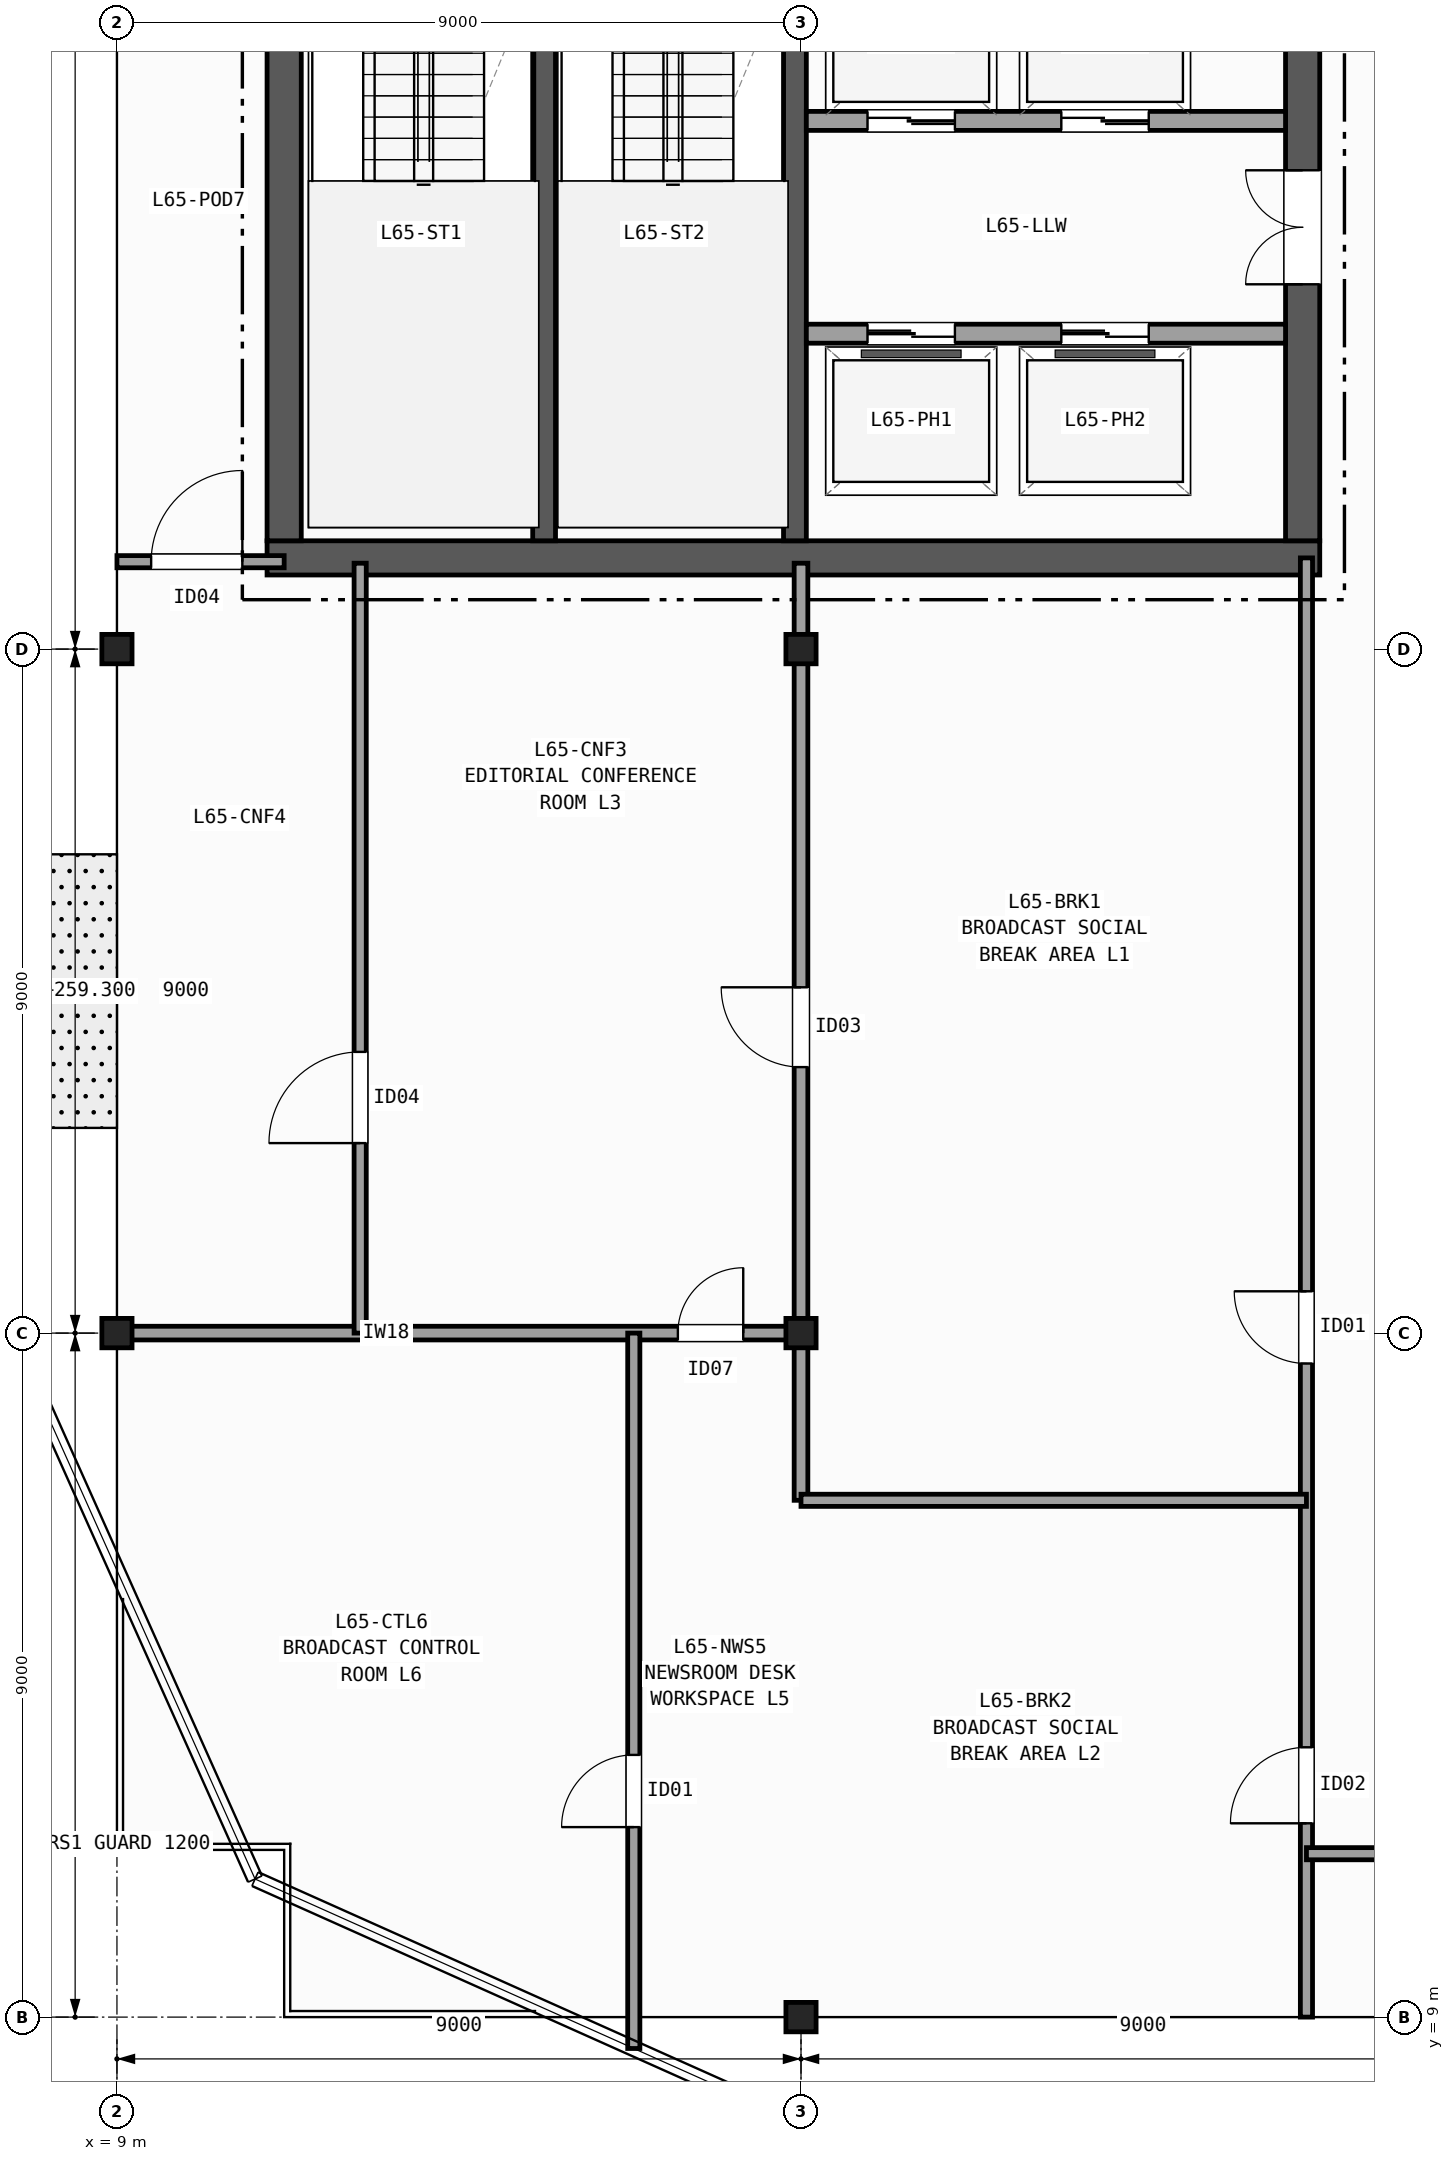
"""IFC4 building model, lengths in metres.
Left out: names, types, materials, properties, quantities, classifications, styles, units other than length and angle.
Written with IfcOpenShell. Run it as: python <this file> out.ifc"""

import sys

from ifc_helpers import new_model, si_unit, direction, frame, frame_2d, origin, origin_2d, place, context, subcontext, project, spatial, rectangle, i_section, extrude, element, fill, save


model = new_model("IFC4")
c1 = context("Model", 3, precision=1e-05, world=origin(), true_north=direction((0.0, 1.0)))
c2 = subcontext(c1, "Body", "Model", "MODEL_VIEW")
j1 = project(units=[si_unit("LENGTHUNIT", "METRE"), si_unit("PLANEANGLEUNIT", "RADIAN")], contexts=[c1])
p1 = place(None, origin())
s1 = spatial("IfcSite", under=j1, at=p1, CompositionType="ELEMENT")
p2 = place(p1, origin())
s2 = spatial("IfcBuilding", under=s1, at=p2, CompositionType="ELEMENT")
p3 = place(p2, frame((0.0, 0.0, 259.3)))
s3 = spatial("IfcBuildingStorey", under=s2, at=p3, CompositionType="ELEMENT", Elevation=259.3)
for number, where, z_axis, x_axis in (
    (1, (9.0, 18.0, 0.0), (0.0, 0.0, 1.0), (1.0, 0.0, 0.0)),
    (2, (9.0, 27.0, 0.0), (0.0, 0.0, 1.0), (1.0, 0.0, 0.0)),
    (3, (18.0, 9.0, 0.0), (0.0, 0.0, 1.0), (1.0, 0.0, 0.0)),
    (4, (18.0, 18.0, 0.0), (0.0, 0.0, 1.0), (1.0, 0.0, 0.0)),
    (5, (18.0, 27.0, 0.0), (0.0, 0.0, 1.0), (1.0, 0.0, 0.0)),
):
    element("IfcColumn", number, at=place(p3, frame(where, z_axis=z_axis, x_axis=x_axis)), inside=s3, PredefinedType="COLUMN", context=c2, shape_type="SweptSolid", body=[
        extrude(i_section(OverallWidth=0.397, OverallDepth=0.387, WebThickness=0.021, FlangeThickness=0.033, FilletRadius=0.015, at=origin_2d()), origin(), (0.0, 0.0, 1.0), 3.7),
    ])
p4 = place(p3, frame((10.975, 28.2, 0.0), z_axis=(0.0, 0.0, 1.0), x_axis=(1.0, 0.0, 0.0)))
e6 = element("IfcWall", 6, at=p4, inside=s3, PredefinedType="SHEAR", context=c2, shape_type="SweptSolid", body=[
    extrude(rectangle(XDim=13.85, YDim=0.45, at=frame_2d((6.925, 0.0))), origin(), (0.0, 0.0, 1.0), 3.42),
])
p5 = place(p3, frame((11.2, 42.175, 0.0), z_axis=(0.0, 0.0, 1.0), x_axis=(0.0, -1.0, 0.0)))
e7 = element("IfcWall", 7, at=p5, inside=s3, PredefinedType="SHEAR", context=c2, shape_type="SweptSolid", body=[
    extrude(rectangle(XDim=13.75, YDim=0.45, at=frame_2d((6.875, 0.0))), origin(), (0.0, 0.0, 1.0), 3.42),
])
p6 = place(p3, frame((24.6, 28.425, 0.0), z_axis=(0.0, 0.0, 1.0), x_axis=(0.0, 1.0, 0.0)))
e8 = element("IfcWall", 8, at=p6, inside=s3, PredefinedType="SHEAR", context=c2, shape_type="SweptSolid", body=[
    extrude(rectangle(XDim=13.75, YDim=0.45, at=frame_2d((6.875, 0.0))), origin(), (0.0, 0.0, 1.0), 3.42),
])
p7 = place(p6, frame((3.375, 0.0, 0.0)))
e9 = element("IfcOpeningElement", 9, at=p7, cuts=e8, PredefinedType="OPENING", context=c2, shape_type="SweptSolid", body=[
    extrude(rectangle(XDim=1.5, YDim=2.2, at=frame_2d((0.75, 1.1))), frame((0.0, 0.235, 0.0), z_axis=(0.0, -1.0, 0.0), x_axis=(1.0, 0.0, 0.0)), (0.0, 0.0, 1.0), 0.47),
])
p8 = place(p6, frame((9.975, 0.0, 0.0)))
e10 = element("IfcOpeningElement", 10, at=p8, cuts=e8, PredefinedType="OPENING", context=c2, shape_type="SweptSolid", body=[
    extrude(rectangle(XDim=0.9, YDim=2.1, at=frame_2d((0.45, 1.05))), frame((0.0, 0.235, 0.0), z_axis=(0.0, -1.0, 0.0), x_axis=(1.0, 0.0, 0.0)), (0.0, 0.0, 1.0), 0.47),
])
p9 = place(p3, frame((14.62, 28.425, 0.0), z_axis=(0.0, 0.0, 1.0), x_axis=(0.0, 1.0, 0.0)))
e11 = element("IfcWall", 11, at=p9, inside=s3, PredefinedType="SHEAR", context=c2, shape_type="SweptSolid", body=[
    extrude(rectangle(XDim=9.025, YDim=0.3, at=frame_2d((4.512, 0.0))), origin(), (0.0, 0.0, 1.0), 3.42),
])
p10 = place(p3, frame((17.92, 42.175, 0.0), z_axis=(0.0, 0.0, 1.0), x_axis=(0.0, -1.0, 0.0)))
e12 = element("IfcWall", 12, at=p10, inside=s3, PredefinedType="SHEAR", context=c2, shape_type="SweptSolid", body=[
    extrude(rectangle(XDim=13.75, YDim=0.3, at=frame_2d((6.875, 0.0))), origin(), (0.0, 0.0, 1.0), 3.42),
])
p11 = place(p10, frame((2.0, 0.0, 0.0)))
e13 = element("IfcOpeningElement", 13, at=p11, cuts=e12, PredefinedType="OPENING", context=c2, shape_type="SweptSolid", body=[
    extrude(rectangle(XDim=1.15, YDim=2.15, at=frame_2d((0.575, 1.075))), frame((0.0, 0.16, 0.0), z_axis=(0.0, -1.0, 0.0), x_axis=(1.0, 0.0, 0.0)), (0.0, 0.0, 1.0), 0.32),
])
p12 = place(p3, frame((18.07, 31.15, 0.0), z_axis=(0.0, 0.0, 1.0), x_axis=(1.0, 0.0, 0.0)))
e14 = element("IfcWall", 14, at=p12, inside=s3, PredefinedType="PARTITIONING", context=c2, shape_type="SweptSolid", body=[
    extrude(rectangle(XDim=6.305, YDim=0.25, at=frame_2d((3.152, 0.0))), origin(), (0.0, 0.0, 1.0), 3.42),
])
p13 = place(p12, frame((0.805, 0.0, 0.0)))
e15 = element("IfcOpeningElement", 15, at=p13, cuts=e14, PredefinedType="OPENING", context=c2, shape_type="SweptSolid", body=[
    extrude(rectangle(XDim=1.15, YDim=2.15, at=frame_2d((0.575, 1.075))), frame((0.0, 0.135, 0.0), z_axis=(0.0, -1.0, 0.0), x_axis=(1.0, 0.0, 0.0)), (0.0, 0.0, 1.0), 0.27),
])
p14 = place(p12, frame((3.355, 0.0, 0.0)))
e16 = element("IfcOpeningElement", 16, at=p14, cuts=e14, PredefinedType="OPENING", context=c2, shape_type="SweptSolid", body=[
    extrude(rectangle(XDim=1.15, YDim=2.15, at=frame_2d((0.575, 1.075))), frame((0.0, 0.135, 0.0), z_axis=(0.0, -1.0, 0.0), x_axis=(1.0, 0.0, 0.0)), (0.0, 0.0, 1.0), 0.27),
])
p15 = place(p3, frame((24.375, 33.95, 0.0), z_axis=(0.0, 0.0, 1.0), x_axis=(-1.0, 0.0, 0.0)))
e17 = element("IfcWall", 17, at=p15, inside=s3, PredefinedType="PARTITIONING", context=c2, shape_type="SweptSolid", body=[
    extrude(rectangle(XDim=6.305, YDim=0.25, at=frame_2d((3.152, 0.0))), origin(), (0.0, 0.0, 1.0), 3.42),
])
p16 = place(p15, frame((4.35, 0.0, 0.0)))
e18 = element("IfcOpeningElement", 18, at=p16, cuts=e17, PredefinedType="OPENING", context=c2, shape_type="SweptSolid", body=[
    extrude(rectangle(XDim=1.15, YDim=2.15, at=frame_2d((0.575, 1.075))), frame((0.0, 0.135, 0.0), z_axis=(0.0, -1.0, 0.0), x_axis=(1.0, 0.0, 0.0)), (0.0, 0.0, 1.0), 0.27),
])
p17 = place(p15, frame((1.8, 0.0, 0.0)))
e19 = element("IfcOpeningElement", 19, at=p17, cuts=e17, PredefinedType="OPENING", context=c2, shape_type="SweptSolid", body=[
    extrude(rectangle(XDim=1.15, YDim=2.15, at=frame_2d((0.575, 1.075))), frame((0.0, 0.135, 0.0), z_axis=(0.0, -1.0, 0.0), x_axis=(1.0, 0.0, 0.0)), (0.0, 0.0, 1.0), 0.27),
])
p18 = place(p3, frame((9.0, 28.15, 0.0), z_axis=(0.0, 0.0, 1.0), x_axis=(1.0, 0.0, 0.0)))
e20 = element("IfcWall", 20, at=p18, inside=s3, PredefinedType="PARTITIONING", context=c2, shape_type="SweptSolid", body=[
    extrude(rectangle(XDim=2.2, YDim=0.16, at=frame_2d((1.1, 0.0))), origin(), (0.0, 0.0, 1.0), 2.707),
])
p19 = place(p18, frame((0.45, 0.0, 0.0)))
e21 = element("IfcOpeningElement", 21, at=p19, cuts=e20, PredefinedType="OPENING", context=c2, shape_type="SweptSolid", body=[
    extrude(rectangle(XDim=1.2, YDim=2.15, at=frame_2d((0.6, 1.075))), frame((0.0, 0.09, 0.0), z_axis=(0.0, -1.0, 0.0), x_axis=(1.0, 0.0, 0.0)), (0.0, 0.0, 1.0), 0.18),
])
p20 = place(p3, frame((24.65, 9.0, 0.0), z_axis=(0.0, 0.0, 1.0), x_axis=(0.0, 1.0, 0.0)))
e22 = element("IfcWall", 22, at=p20, inside=s3, PredefinedType="PARTITIONING", context=c2, shape_type="SweptSolid", body=[
    extrude(rectangle(XDim=19.2, YDim=0.16, at=frame_2d((9.6, 0.0))), origin(), (0.0, 0.0, 1.0), 2.707),
])
p21 = place(p20, frame((8.6, 0.0, 0.0)))
e23 = element("IfcOpeningElement", 23, at=p21, cuts=e22, PredefinedType="OPENING", context=c2, shape_type="SweptSolid", body=[
    extrude(rectangle(XDim=0.95, YDim=2.1, at=frame_2d((0.475, 1.05))), frame((0.0, 0.09, 0.0), z_axis=(0.0, -1.0, 0.0), x_axis=(1.0, 0.0, 0.0)), (0.0, 0.0, 1.0), 0.18),
])
p22 = place(p20, frame((2.55, 0.0, 0.0)))
e24 = element("IfcOpeningElement", 24, at=p22, cuts=e22, PredefinedType="OPENING", context=c2, shape_type="SweptSolid", body=[
    extrude(rectangle(XDim=1.0, YDim=2.1, at=frame_2d((0.5, 1.05))), frame((0.0, 0.09, 0.0), z_axis=(0.0, -1.0, 0.0), x_axis=(1.0, 0.0, 0.0)), (0.0, 0.0, 1.0), 0.18),
])
p23 = place(p3, frame((9.0, 18.0, 0.0), z_axis=(0.0, 0.0, 1.0), x_axis=(1.0, 0.0, 0.0)))
e25 = element("IfcWall", 25, at=p23, inside=s3, PredefinedType="PARTITIONING", context=c2, shape_type="SweptSolid", body=[
    extrude(rectangle(XDim=9.08, YDim=0.18, at=frame_2d((4.54, 0.0))), origin(), (0.0, 0.0, 1.0), 2.707),
])
p24 = place(p23, frame((7.38, 0.0, 0.0)))
e26 = element("IfcOpeningElement", 26, at=p24, cuts=e25, PredefinedType="OPENING", context=c2, shape_type="SweptSolid", body=[
    extrude(rectangle(XDim=0.86, YDim=2.05, at=frame_2d((0.43, 1.025))), frame((0.0, 0.1, 0.0), z_axis=(0.0, -1.0, 0.0), x_axis=(1.0, 0.0, 0.0)), (0.0, 0.0, 1.0), 0.2),
])
p25 = place(p3, frame((18.0, 15.8, 0.0), z_axis=(0.0, 0.0, 1.0), x_axis=(0.0, 1.0, 0.0)))
e27 = element("IfcWall", 27, at=p25, inside=s3, PredefinedType="PARTITIONING", context=c2, shape_type="SweptSolid", body=[
    extrude(rectangle(XDim=12.33, YDim=0.18, at=frame_2d((6.165, 0.0))), origin(), (0.0, 0.0, 1.0), 2.789),
])
p26 = place(p25, frame((5.7, 0.0, 0.0)))
e28 = element("IfcOpeningElement", 28, at=p26, cuts=e27, PredefinedType="OPENING", context=c2, shape_type="SweptSolid", body=[
    extrude(rectangle(XDim=1.05, YDim=2.15, at=frame_2d((0.525, 1.075))), frame((0.0, 0.1, 0.0), z_axis=(0.0, -1.0, 0.0), x_axis=(1.0, 0.0, 0.0)), (0.0, 0.0, 1.0), 0.2),
])
p27 = place(p3, frame((18.0, 15.8, 0.0), z_axis=(0.0, 0.0, 1.0), x_axis=(1.0, 0.0, 0.0)))
e29 = element("IfcWall", 29, at=p27, inside=s3, PredefinedType="PARTITIONING", context=c2, shape_type="SweptSolid", body=[
    extrude(rectangle(XDim=6.65, YDim=0.16, at=frame_2d((3.325, 0.0))), origin(), (0.0, 0.0, 1.0), 2.789),
])
p28 = place(p3, frame((12.2, 18.0, 0.0), z_axis=(0.0, 0.0, 1.0), x_axis=(0.0, 1.0, 0.0)))
e30 = element("IfcWall", 30, at=p28, inside=s3, PredefinedType="PARTITIONING", context=c2, shape_type="SweptSolid", body=[
    extrude(rectangle(XDim=10.13, YDim=0.16, at=frame_2d((5.065, 0.0))), origin(), (0.0, 0.0, 1.0), 2.789),
])
p29 = place(p28, frame((2.5, 0.0, 0.0)))
e31 = element("IfcOpeningElement", 31, at=p29, cuts=e30, PredefinedType="OPENING", context=c2, shape_type="SweptSolid", body=[
    extrude(rectangle(XDim=1.2, YDim=2.15, at=frame_2d((0.6, 1.075))), frame((0.0, 0.09, 0.0), z_axis=(0.0, -1.0, 0.0), x_axis=(1.0, 0.0, 0.0)), (0.0, 0.0, 1.0), 0.18),
])
p30 = place(p3, frame((15.8, 8.587, 0.0), z_axis=(0.0, 0.0, 1.0), x_axis=(0.0, 1.0, 0.0)))
e32 = element("IfcWall", 32, at=p30, inside=s3, PredefinedType="PARTITIONING", context=c2, shape_type="SweptSolid", body=[
    extrude(rectangle(XDim=9.413, YDim=0.16, at=frame_2d((4.707, 0.0))), origin(), (0.0, 0.0, 1.0), 2.789),
])
p31 = place(p30, frame((2.913, 0.0, 0.0)))
e33 = element("IfcOpeningElement", 33, at=p31, cuts=e32, PredefinedType="OPENING", context=c2, shape_type="SweptSolid", body=[
    extrude(rectangle(XDim=0.95, YDim=2.1, at=frame_2d((0.475, 1.05))), frame((0.0, 0.09, 0.0), z_axis=(0.0, -1.0, 0.0), x_axis=(1.0, 0.0, 0.0)), (0.0, 0.0, 1.0), 0.18),
])
p32 = place(p3, frame((24.65, 11.15, 0.0), z_axis=(0.0, 0.0, 1.0), x_axis=(1.0, 0.0, 0.0)))
e34 = element("IfcWall", 34, at=p32, inside=s3, PredefinedType="PARTITIONING", context=c2, shape_type="SweptSolid", body=[
    extrude(rectangle(XDim=4.75, YDim=0.16, at=frame_2d((2.375, 0.0))), origin(), (0.0, 0.0, 1.0), 2.792),
])
p33 = place(p32, frame((1.2, 0.0, 0.0)))
e35 = element("IfcOpeningElement", 35, at=p33, cuts=e34, PredefinedType="OPENING", context=c2, shape_type="SweptSolid", body=[
    extrude(rectangle(XDim=1.0, YDim=2.1, at=frame_2d((0.5, 1.05))), frame((0.0, 0.09, 0.0), z_axis=(0.0, -1.0, 0.0), x_axis=(1.0, 0.0, 0.0)), (0.0, 0.0, 1.0), 0.18),
])
p34 = place(p7, origin())
e36 = element("IfcDoor", 36, at=p34, inside=s3, OperationType="DOUBLE_DOOR_SINGLE_SWING", PredefinedType="DOOR", context=c2, shape_type="SweptSolid", body=[
    extrude(rectangle(XDim=1.5, YDim=2.2, at=frame_2d((0.75, 1.1))), frame((0.0, 0.025, 0.0), z_axis=(0.0, -1.0, 0.0), x_axis=(1.0, 0.0, 0.0)), (0.0, 0.0, 1.0), 0.05),
])
fill(e9, e36)
p35 = place(p13, origin())
e37 = element("IfcDoor", 37, at=p35, inside=s3, OperationType="DOUBLE_DOOR_SLIDING", PredefinedType="DOOR", context=c2, shape_type="SweptSolid", body=[
    extrude(rectangle(XDim=1.15, YDim=2.15, at=frame_2d((0.575, 1.075))), frame((0.0, 0.025, 0.0), z_axis=(0.0, -1.0, 0.0), x_axis=(1.0, 0.0, 0.0)), (0.0, 0.0, 1.0), 0.05),
])
fill(e15, e37)
p36 = place(p14, origin())
e38 = element("IfcDoor", 38, at=p36, inside=s3, OperationType="DOUBLE_DOOR_SLIDING", PredefinedType="DOOR", context=c2, shape_type="SweptSolid", body=[
    extrude(rectangle(XDim=1.15, YDim=2.15, at=frame_2d((0.575, 1.075))), frame((0.0, 0.025, 0.0), z_axis=(0.0, -1.0, 0.0), x_axis=(1.0, 0.0, 0.0)), (0.0, 0.0, 1.0), 0.05),
])
fill(e16, e38)
p37 = place(p16, origin())
e39 = element("IfcDoor", 39, at=p37, inside=s3, OperationType="DOUBLE_DOOR_SLIDING", PredefinedType="DOOR", context=c2, shape_type="SweptSolid", body=[
    extrude(rectangle(XDim=1.15, YDim=2.15, at=frame_2d((0.575, 1.075))), frame((0.0, 0.025, 0.0), z_axis=(0.0, -1.0, 0.0), x_axis=(1.0, 0.0, 0.0)), (0.0, 0.0, 1.0), 0.05),
])
fill(e18, e39)
p38 = place(p17, origin())
e40 = element("IfcDoor", 40, at=p38, inside=s3, OperationType="DOUBLE_DOOR_SLIDING", PredefinedType="DOOR", context=c2, shape_type="SweptSolid", body=[
    extrude(rectangle(XDim=1.15, YDim=2.15, at=frame_2d((0.575, 1.075))), frame((0.0, 0.025, 0.0), z_axis=(0.0, -1.0, 0.0), x_axis=(1.0, 0.0, 0.0)), (0.0, 0.0, 1.0), 0.05),
])
fill(e19, e40)
p39 = place(p19, origin())
e41 = element("IfcDoor", 41, at=p39, inside=s3, OperationType="SINGLE_SWING_RIGHT", PredefinedType="DOOR", context=c2, shape_type="SweptSolid", body=[
    extrude(rectangle(XDim=1.2, YDim=2.15, at=frame_2d((0.6, 1.075))), frame((0.0, 0.025, 0.0), z_axis=(0.0, -1.0, 0.0), x_axis=(1.0, 0.0, 0.0)), (0.0, 0.0, 1.0), 0.05),
])
fill(e21, e41)
p40 = place(p21, origin())
e42 = element("IfcDoor", 42, at=p40, inside=s3, OperationType="SINGLE_SWING_RIGHT", PredefinedType="DOOR", context=c2, shape_type="SweptSolid", body=[
    extrude(rectangle(XDim=0.95, YDim=2.1, at=frame_2d((0.475, 1.05))), frame((0.0, 0.025, 0.0), z_axis=(0.0, -1.0, 0.0), x_axis=(1.0, 0.0, 0.0)), (0.0, 0.0, 1.0), 0.05),
])
fill(e23, e42)
p41 = place(p22, origin())
e43 = element("IfcDoor", 43, at=p41, inside=s3, OperationType="SINGLE_SWING_LEFT", PredefinedType="DOOR", context=c2, shape_type="SweptSolid", body=[
    extrude(rectangle(XDim=1.0, YDim=2.1, at=frame_2d((0.5, 1.05))), frame((0.0, 0.025, 0.0), z_axis=(0.0, -1.0, 0.0), x_axis=(1.0, 0.0, 0.0)), (0.0, 0.0, 1.0), 0.05),
])
fill(e24, e43)
p42 = place(p26, origin())
e44 = element("IfcDoor", 44, at=p42, inside=s3, OperationType="SINGLE_SWING_RIGHT", PredefinedType="DOOR", context=c2, shape_type="SweptSolid", body=[
    extrude(rectangle(XDim=1.05, YDim=2.15, at=frame_2d((0.525, 1.075))), frame((0.0, 0.025, 0.0), z_axis=(0.0, -1.0, 0.0), x_axis=(1.0, 0.0, 0.0)), (0.0, 0.0, 1.0), 0.05),
])
fill(e28, e44)
p43 = place(p29, origin())
e45 = element("IfcDoor", 45, at=p43, inside=s3, OperationType="SINGLE_SWING_LEFT", PredefinedType="DOOR", context=c2, shape_type="SweptSolid", body=[
    extrude(rectangle(XDim=1.2, YDim=2.15, at=frame_2d((0.6, 1.075))), frame((0.0, 0.025, 0.0), z_axis=(0.0, -1.0, 0.0), x_axis=(1.0, 0.0, 0.0)), (0.0, 0.0, 1.0), 0.05),
])
fill(e31, e45)
p44 = place(p24, origin())
e46 = element("IfcDoor", 46, at=p44, inside=s3, OperationType="SINGLE_SWING_RIGHT", PredefinedType="DOOR", context=c2, shape_type="SweptSolid", body=[
    extrude(rectangle(XDim=0.86, YDim=2.05, at=frame_2d((0.43, 1.025))), frame((0.0, 0.025, 0.0), z_axis=(0.0, -1.0, 0.0), x_axis=(1.0, 0.0, 0.0)), (0.0, 0.0, 1.0), 0.05),
])
fill(e26, e46)
p45 = place(p31, origin())
e47 = element("IfcDoor", 47, at=p45, inside=s3, OperationType="SINGLE_SWING_LEFT", PredefinedType="DOOR", context=c2, shape_type="SweptSolid", body=[
    extrude(rectangle(XDim=0.95, YDim=2.1, at=frame_2d((0.475, 1.05))), frame((0.0, 0.025, 0.0), z_axis=(0.0, -1.0, 0.0), x_axis=(1.0, 0.0, 0.0)), (0.0, 0.0, 1.0), 0.05),
])
fill(e33, e47)
save(model, sys.argv[1])
